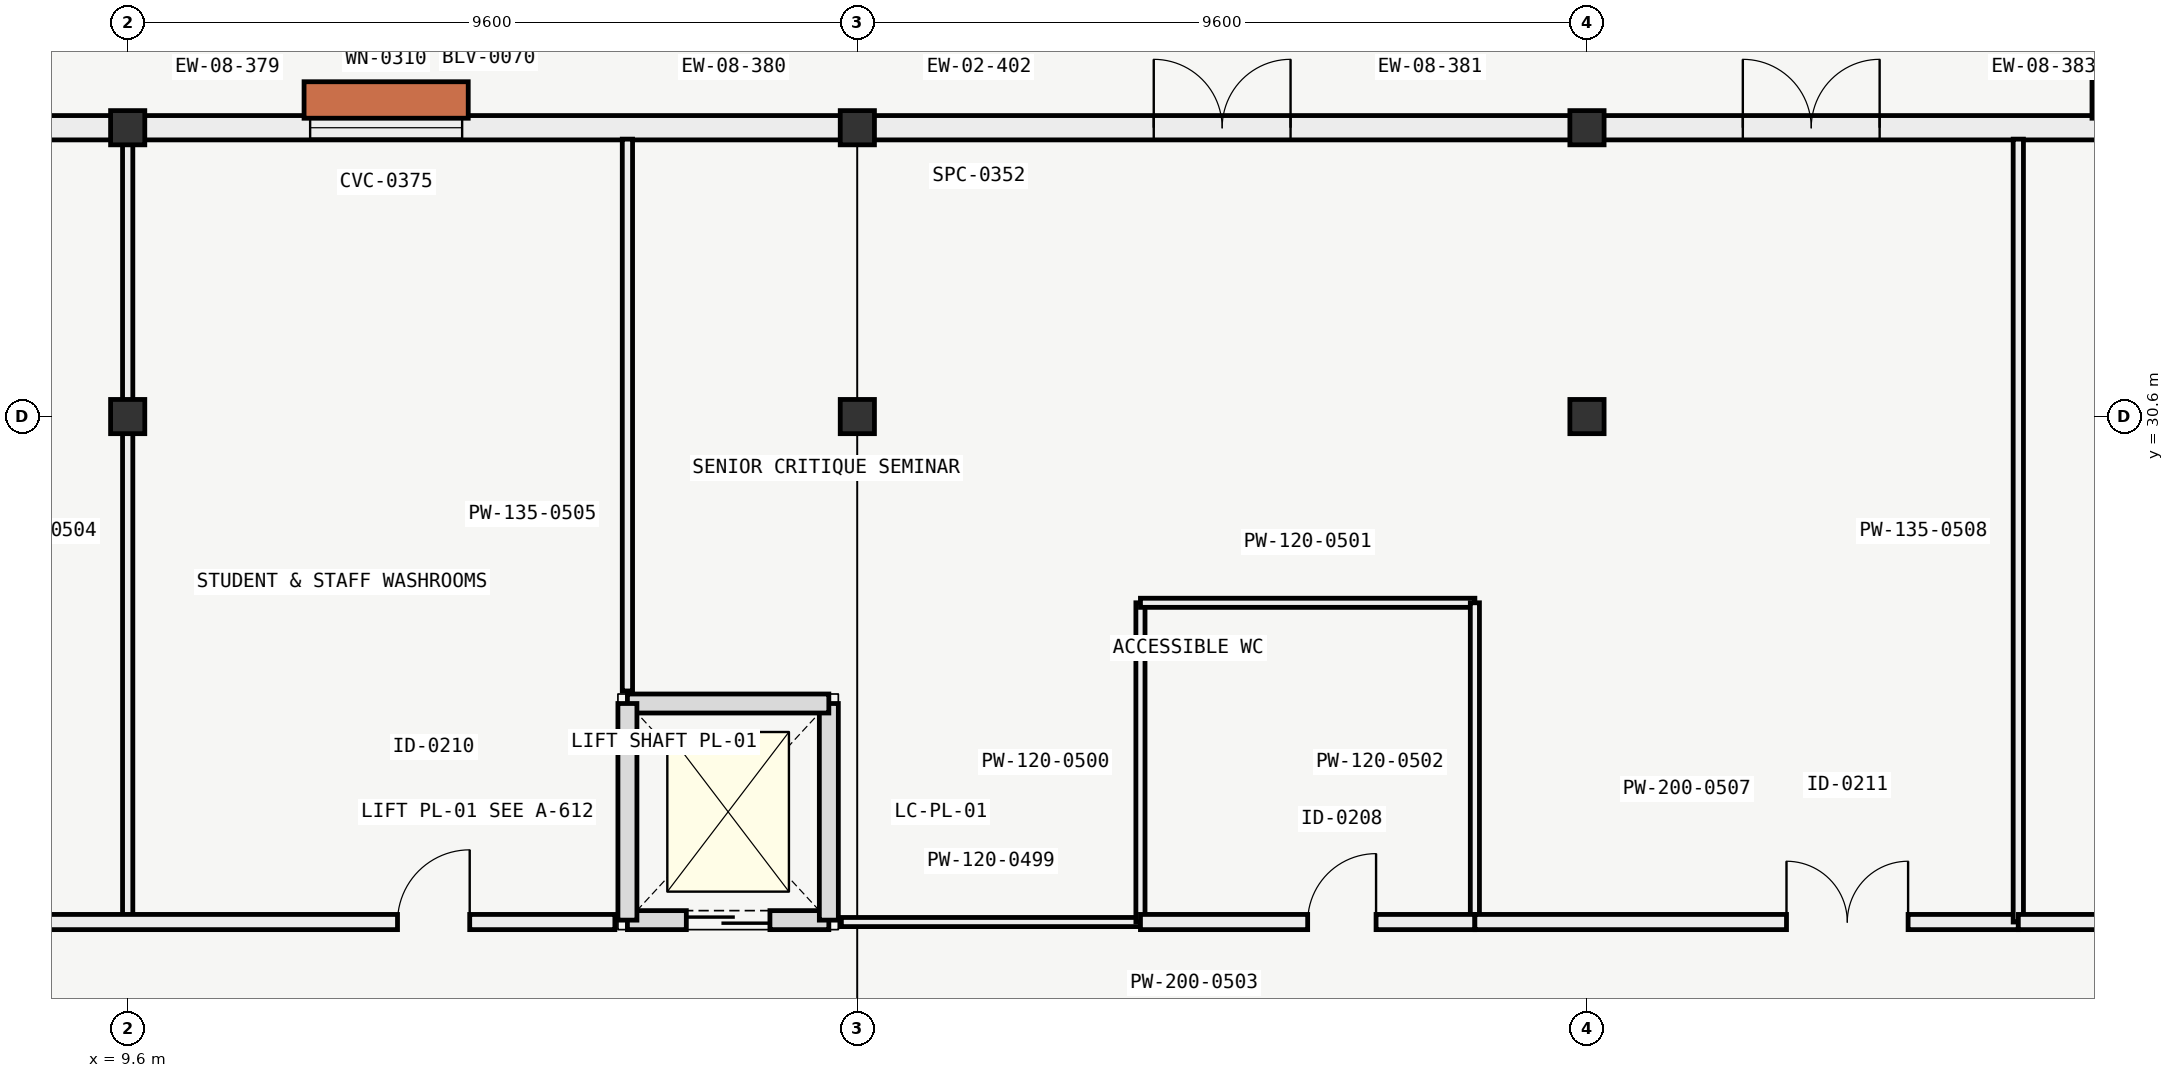
"""IFC4 building model, lengths in metres.
Left out: names, types, materials, properties, quantities, classifications, styles, units other than length and angle.
Written with IfcOpenShell. Run it as: python <this file> out.ifc"""

import sys

from ifc_helpers import new_model, si_unit, direction, frame, frame_2d, origin, origin_2d, place, context, subcontext, project, spatial, rectangle, extrude, element, fill, save


model = new_model("IFC4")
c1 = context("Model", 3, precision=1e-05, world=origin(), true_north=direction((0.0, 1.0)))
c2 = subcontext(c1, "Body", "Model", "MODEL_VIEW")
j1 = project(units=[si_unit("LENGTHUNIT", "METRE"), si_unit("PLANEANGLEUNIT", "RADIAN")], contexts=[c1])
p1 = place(None, origin())
s1 = spatial("IfcSite", under=j1, at=p1, CompositionType="ELEMENT")
p2 = place(p1, origin())
s2 = spatial("IfcBuilding", under=s1, at=p2, CompositionType="ELEMENT")
p3 = place(p2, frame((0.0, 0.0, 30.6)))
s3 = spatial("IfcBuildingStorey", under=s2, at=p3, CompositionType="ELEMENT", Elevation=30.6)
for number, where, z_axis, x_axis in (
    (1, (9.6, 30.6, 0.0), (0.0, 0.0, 1.0), (1.0, 0.0, 0.0)),
    (2, (9.6, 34.4, 0.0), (0.0, 0.0, 1.0), (1.0, 0.0, 0.0)),
    (3, (19.2, 30.6, 0.0), (0.0, 0.0, 1.0), (1.0, 0.0, 0.0)),
    (4, (19.2, 34.4, 0.0), (0.0, 0.0, 1.0), (1.0, 0.0, 0.0)),
    (5, (28.8, 30.6, 0.0), (0.0, 0.0, 1.0), (1.0, 0.0, 0.0)),
    (6, (28.8, 34.4, 0.0), (0.0, 0.0, 1.0), (1.0, 0.0, 0.0)),
):
    element("IfcColumn", number, at=place(p3, frame(where, z_axis=z_axis, x_axis=x_axis)), inside=s3, PredefinedType="COLUMN", context=c2, shape_type="SweptSolid", body=[
        extrude(rectangle(XDim=0.45, YDim=0.45, at=origin_2d()), origin(), (0.0, 0.0, 1.0), 4.2),
    ])
p4 = place(p3, frame((0.226, 34.4, 0.0), z_axis=(0.0, 0.0, 1.0), x_axis=(1.0, 0.0, 0.0)))
e7 = element("IfcWall", 7, at=p4, inside=s3, PredefinedType="SOLIDWALL", context=c2, shape_type="SweptSolid", body=[
    extrude(rectangle(XDim=9.148, YDim=0.28, at=frame_2d((4.574, 0.0))), origin(), (0.0, 0.0, 1.0), 3.3),
])
p5 = place(p4, frame((3.574, 0.0, 0.85)))
e8 = element("IfcOpeningElement", 8, at=p5, cuts=e7, PredefinedType="OPENING", context=c2, shape_type="SweptSolid", body=[
    extrude(rectangle(XDim=2.0, YDim=1.35, at=frame_2d((1.0, 0.675))), frame((0.0, 0.15, 0.0), z_axis=(0.0, -1.0, 0.0), x_axis=(1.0, 0.0, 0.0)), (0.0, 0.0, 1.0), 0.3),
])
p6 = place(p3, frame((9.826, 34.4, 0.0), z_axis=(0.0, 0.0, 1.0), x_axis=(1.0, 0.0, 0.0)))
e9 = element("IfcWall", 9, at=p6, inside=s3, PredefinedType="SOLIDWALL", context=c2, shape_type="SweptSolid", body=[
    extrude(rectangle(XDim=6.349, YDim=0.28, at=frame_2d((3.175, 0.0))), origin(), (0.0, 0.0, 1.0), 3.3),
])
p7 = place(p6, frame((2.175, 0.0, 0.85)))
e10 = element("IfcOpeningElement", 10, at=p7, cuts=e9, PredefinedType="OPENING", context=c2, shape_type="SweptSolid", body=[
    extrude(rectangle(XDim=2.0, YDim=1.35, at=frame_2d((1.0, 0.675))), frame((0.0, 0.15, 0.0), z_axis=(0.0, -1.0, 0.0), x_axis=(1.0, 0.0, 0.0)), (0.0, 0.0, 1.0), 0.3),
])
p8 = place(p3, frame((16.175, 34.4, 0.0), z_axis=(0.0, 0.0, 1.0), x_axis=(1.0, 0.0, 0.0)))
e11 = element("IfcWall", 11, at=p8, inside=s3, PredefinedType="SOLIDWALL", context=c2, shape_type="SweptSolid", body=[
    extrude(rectangle(XDim=2.799, YDim=0.28, at=frame_2d((1.399, 0.0))), origin(), (0.0, 0.0, 1.0), 3.3),
])
p9 = place(p3, frame((19.426, 34.4, 0.0), z_axis=(0.0, 0.0, 1.0), x_axis=(1.0, 0.0, 0.0)))
e12 = element("IfcWall", 12, at=p9, inside=s3, PredefinedType="SOLIDWALL", context=c2, shape_type="SweptSolid", body=[
    extrude(rectangle(XDim=9.148, YDim=0.28, at=frame_2d((4.574, 0.0))), origin(), (0.0, 0.0, 1.0), 3.3),
])
p10 = place(p9, frame((3.674, 0.0, 0.0)))
e13 = element("IfcOpeningElement", 13, at=p10, cuts=e12, PredefinedType="OPENING", context=c2, shape_type="SweptSolid", body=[
    extrude(rectangle(XDim=1.8, YDim=2.2, at=frame_2d((0.9, 1.1))), frame((0.0, 0.15, 0.0), z_axis=(0.0, -1.0, 0.0), x_axis=(1.0, 0.0, 0.0)), (0.0, 0.0, 1.0), 0.3),
])
p11 = place(p3, frame((29.026, 34.4, 0.0), z_axis=(0.0, 0.0, 1.0), x_axis=(1.0, 0.0, 0.0)))
e14 = element("IfcWall", 14, at=p11, inside=s3, PredefinedType="SOLIDWALL", context=c2, shape_type="SweptSolid", body=[
    extrude(rectangle(XDim=5.449, YDim=0.28, at=frame_2d((2.725, 0.0))), origin(), (0.0, 0.0, 1.0), 3.3),
])
p12 = place(p11, frame((1.824, 0.0, 0.0)))
e15 = element("IfcOpeningElement", 15, at=p12, cuts=e14, PredefinedType="OPENING", context=c2, shape_type="SweptSolid", body=[
    extrude(rectangle(XDim=1.8, YDim=2.2, at=frame_2d((0.9, 1.1))), frame((0.0, 0.15, 0.0), z_axis=(0.0, -1.0, 0.0), x_axis=(1.0, 0.0, 0.0)), (0.0, 0.0, 1.0), 0.3),
])
p13 = place(p3, frame((34.475, 34.4, 0.0), z_axis=(0.0, 0.0, 1.0), x_axis=(1.0, 0.0, 0.0)))
e16 = element("IfcWall", 16, at=p13, inside=s3, PredefinedType="SOLIDWALL", context=c2, shape_type="SweptSolid", body=[
    extrude(rectangle(XDim=3.699, YDim=0.28, at=frame_2d((1.85, 0.0))), origin(), (0.0, 0.0, 1.0), 3.3),
])
p14 = place(p13, frame((1.05, 0.0, 0.85)))
e17 = element("IfcOpeningElement", 17, at=p14, cuts=e16, PredefinedType="OPENING", context=c2, shape_type="SweptSolid", body=[
    extrude(rectangle(XDim=1.6, YDim=1.9, at=frame_2d((0.8, 0.95))), frame((0.0, 0.15, 0.0), z_axis=(0.0, -1.0, 0.0), x_axis=(1.0, 0.0, 0.0)), (0.0, 0.0, 1.0), 0.3),
])
p15 = place(p3, frame((0.0, 34.4, 4.2), z_axis=(0.0, 0.0, 1.0), x_axis=(1.0, 0.0, 0.0)))
e18 = element("IfcWall", 18, at=p15, inside=s3, PredefinedType="SOLIDWALL", context=c2, shape_type="SweptSolid", body=[
    extrude(rectangle(XDim=41.6, YDim=0.32, at=frame_2d((20.8, 0.0))), origin(), (0.0, 0.0, 1.0), 0.551),
])
p16 = place(p3, frame((16.175, 23.975, 0.0), z_axis=(0.0, 0.0, 1.0), x_axis=(1.0, 0.0, 0.0)))
e19 = element("IfcWall", 19, at=p16, inside=s3, PredefinedType="SOLIDWALL", context=c2, shape_type="SweptSolid", body=[
    extrude(rectangle(XDim=2.65, YDim=0.25, at=frame_2d((1.325, 0.0))), origin(), (0.0, 0.0, 1.0), 3.4),
])
p17 = place(p16, frame((0.775, 0.0, 0.0)))
e20 = element("IfcOpeningElement", 20, at=p17, cuts=e19, PredefinedType="OPENING", context=c2, shape_type="SweptSolid", body=[
    extrude(rectangle(XDim=1.1, YDim=2.1, at=frame_2d((0.55, 1.05))), frame((0.0, 0.135, 0.0), z_axis=(0.0, -1.0, 0.0), x_axis=(1.0, 0.0, 0.0)), (0.0, 0.0, 1.0), 0.27),
])
p18 = place(p3, frame((18.825, 23.975, 0.0), z_axis=(0.0, 0.0, 1.0), x_axis=(0.0, 1.0, 0.0)))
e21 = element("IfcWall", 21, at=p18, inside=s3, PredefinedType="SOLIDWALL", context=c2, shape_type="SweptSolid", body=[
    extrude(rectangle(XDim=2.85, YDim=0.25, at=frame_2d((1.425, 0.0))), origin(), (0.0, 0.0, 1.0), 3.4),
])
p19 = place(p3, frame((18.825, 26.825, 0.0), z_axis=(0.0, 0.0, 1.0), x_axis=(-1.0, 0.0, 0.0)))
e22 = element("IfcWall", 22, at=p19, inside=s3, PredefinedType="SOLIDWALL", context=c2, shape_type="SweptSolid", body=[
    extrude(rectangle(XDim=2.65, YDim=0.25, at=frame_2d((1.325, 0.0))), origin(), (0.0, 0.0, 1.0), 3.4),
])
p20 = place(p3, frame((16.175, 26.825, 0.0), z_axis=(0.0, 0.0, 1.0), x_axis=(0.0, -1.0, 0.0)))
e23 = element("IfcWall", 23, at=p20, inside=s3, PredefinedType="SOLIDWALL", context=c2, shape_type="SweptSolid", body=[
    extrude(rectangle(XDim=2.85, YDim=0.25, at=frame_2d((1.425, 0.0))), origin(), (0.0, 0.0, 1.0), 3.4),
])
p21 = place(p3, frame((18.99, 23.95, 0.0), z_axis=(0.0, 0.0, 1.0), x_axis=(1.0, 0.0, 0.0)))
e24 = element("IfcWall", 24, at=p21, inside=s3, PredefinedType="PARTITIONING", context=c2, shape_type="SweptSolid", body=[
    extrude(rectangle(XDim=3.935, YDim=0.12, at=frame_2d((1.968, 0.0))), origin(), (0.0, 0.0, 1.0), 3.85),
])
p22 = place(p3, frame((22.925, 23.95, 0.0), z_axis=(0.0, 0.0, 1.0), x_axis=(0.0, 1.0, 0.0)))
e25 = element("IfcWall", 25, at=p22, inside=s3, PredefinedType="PARTITIONING", context=c2, shape_type="SweptSolid", body=[
    extrude(rectangle(XDim=4.2, YDim=0.12, at=frame_2d((2.1, 0.0))), origin(), (0.0, 0.0, 1.0), 3.85),
])
p23 = place(p3, frame((22.925, 28.15, 0.0), z_axis=(0.0, 0.0, 1.0), x_axis=(1.0, 0.0, 0.0)))
e26 = element("IfcWall", 26, at=p23, inside=s3, PredefinedType="PARTITIONING", context=c2, shape_type="SweptSolid", body=[
    extrude(rectangle(XDim=4.4, YDim=0.12, at=frame_2d((2.2, 0.0))), origin(), (0.0, 0.0, 1.0), 3.85),
])
p24 = place(p3, frame((27.325, 23.95, 0.0), z_axis=(0.0, 0.0, 1.0), x_axis=(0.0, 1.0, 0.0)))
e27 = element("IfcWall", 27, at=p24, inside=s3, PredefinedType="PARTITIONING", context=c2, shape_type="SweptSolid", body=[
    extrude(rectangle(XDim=4.2, YDim=0.12, at=frame_2d((2.1, 0.0))), origin(), (0.0, 0.0, 1.0), 3.85),
])
p25 = place(p3, frame((22.925, 23.95, 0.0), z_axis=(0.0, 0.0, 1.0), x_axis=(1.0, 0.0, 0.0)))
e28 = element("IfcWall", 28, at=p25, inside=s3, PredefinedType="PARTITIONING", context=c2, shape_type="SweptSolid", body=[
    extrude(rectangle(XDim=4.4, YDim=0.2, at=frame_2d((2.2, 0.0))), origin(), (0.0, 0.0, 1.0), 3.85),
])
p26 = place(p25, frame((2.2, 0.0, 0.0)))
e29 = element("IfcOpeningElement", 29, at=p26, cuts=e28, PredefinedType="OPENING", context=c2, shape_type="SweptSolid", body=[
    extrude(rectangle(XDim=0.9, YDim=2.05, at=frame_2d((0.45, 1.025))), frame((0.0, 0.11, 0.0), z_axis=(0.0, -1.0, 0.0), x_axis=(1.0, 0.0, 0.0)), (0.0, 0.0, 1.0), 0.22),
])
p27 = place(p3, frame((9.6, 23.95, 0.0), z_axis=(0.0, 0.0, 1.0), x_axis=(0.0, 1.0, 0.0)))
e30 = element("IfcWall", 30, at=p27, inside=s3, PredefinedType="PARTITIONING", context=c2, shape_type="SweptSolid", body=[
    extrude(rectangle(XDim=10.3, YDim=0.135, at=frame_2d((5.15, 0.0))), origin(), (0.0, 0.0, 1.0), 3.85),
])
p28 = place(p3, frame((16.175, 26.99, 0.0), z_axis=(0.0, 0.0, 1.0), x_axis=(0.0, 1.0, 0.0)))
e31 = element("IfcWall", 31, at=p28, inside=s3, PredefinedType="PARTITIONING", context=c2, shape_type="SweptSolid", body=[
    extrude(rectangle(XDim=7.26, YDim=0.135, at=frame_2d((3.63, 0.0))), origin(), (0.0, 0.0, 1.0), 3.85),
])
p29 = place(p3, frame((0.15, 23.95, 0.0), z_axis=(0.0, 0.0, 1.0), x_axis=(1.0, 0.0, 0.0)))
e32 = element("IfcWall", 32, at=p29, inside=s3, PredefinedType="PARTITIONING", context=c2, shape_type="SweptSolid", body=[
    extrude(rectangle(XDim=15.86, YDim=0.2, at=frame_2d((7.93, 0.0))), origin(), (0.0, 0.0, 1.0), 3.63),
])
p30 = place(p29, frame((6.05, 0.0, 0.0)))
e33 = element("IfcOpeningElement", 33, at=p30, cuts=e32, PredefinedType="OPENING", context=c2, shape_type="SweptSolid", body=[
    extrude(rectangle(XDim=1.6, YDim=2.25, at=frame_2d((0.8, 1.125))), frame((0.0, 0.11, 0.0), z_axis=(0.0, -1.0, 0.0), x_axis=(1.0, 0.0, 0.0)), (0.0, 0.0, 1.0), 0.22),
])
p31 = place(p29, frame((13.0, 0.0, 0.0)))
e34 = element("IfcOpeningElement", 34, at=p31, cuts=e32, PredefinedType="OPENING", context=c2, shape_type="SweptSolid", body=[
    extrude(rectangle(XDim=0.95, YDim=2.1, at=frame_2d((0.475, 1.05))), frame((0.0, 0.11, 0.0), z_axis=(0.0, -1.0, 0.0), x_axis=(1.0, 0.0, 0.0)), (0.0, 0.0, 1.0), 0.22),
])
p32 = place(p3, frame((27.325, 23.95, 0.0), z_axis=(0.0, 0.0, 1.0), x_axis=(1.0, 0.0, 0.0)))
e35 = element("IfcWall", 35, at=p32, inside=s3, PredefinedType="PARTITIONING", context=c2, shape_type="SweptSolid", body=[
    extrude(rectangle(XDim=7.15, YDim=0.2, at=frame_2d((3.575, 0.0))), origin(), (0.0, 0.0, 1.0), 3.85),
])
p33 = place(p32, frame((4.1, 0.0, 0.0)))
e36 = element("IfcOpeningElement", 36, at=p33, cuts=e35, PredefinedType="OPENING", context=c2, shape_type="SweptSolid", body=[
    extrude(rectangle(XDim=1.6, YDim=2.25, at=frame_2d((0.8, 1.125))), frame((0.0, 0.11, 0.0), z_axis=(0.0, -1.0, 0.0), x_axis=(1.0, 0.0, 0.0)), (0.0, 0.0, 1.0), 0.22),
])
p34 = place(p3, frame((34.475, 23.95, 0.0), z_axis=(0.0, 0.0, 1.0), x_axis=(0.0, 1.0, 0.0)))
e37 = element("IfcWall", 37, at=p34, inside=s3, PredefinedType="PARTITIONING", context=c2, shape_type="SweptSolid", body=[
    extrude(rectangle(XDim=10.3, YDim=0.135, at=frame_2d((5.15, 0.0))), origin(), (0.0, 0.0, 1.0), 3.85),
])
p35 = place(p3, frame((34.475, 23.95, 0.0), z_axis=(0.0, 0.0, 1.0), x_axis=(1.0, 0.0, 0.0)))
e38 = element("IfcWall", 38, at=p35, inside=s3, PredefinedType="PARTITIONING", context=c2, shape_type="SweptSolid", body=[
    extrude(rectangle(XDim=6.975, YDim=0.2, at=frame_2d((3.487, 0.0))), origin(), (0.0, 0.0, 1.0), 3.85),
])
p36 = place(p35, frame((2.1, 0.0, 0.0)))
e39 = element("IfcOpeningElement", 39, at=p36, cuts=e38, PredefinedType="OPENING", context=c2, shape_type="SweptSolid", body=[
    extrude(rectangle(XDim=0.95, YDim=2.1, at=frame_2d((0.475, 1.05))), frame((0.0, 0.11, 0.0), z_axis=(0.0, -1.0, 0.0), x_axis=(1.0, 0.0, 0.0)), (0.0, 0.0, 1.0), 0.22),
])
p37 = place(p7, origin())
e40 = element("IfcWindow", 40, at=p37, inside=s3, PartitioningType="SINGLE_PANEL", PredefinedType="WINDOW", context=c2, shape_type="SweptSolid", body=[
    extrude(rectangle(XDim=2.0, YDim=1.35, at=frame_2d((1.0, 0.675))), frame((0.0, 0.03, 0.0), z_axis=(0.0, -1.0, 0.0), x_axis=(1.0, 0.0, 0.0)), (0.0, 0.0, 1.0), 0.06),
])
fill(e10, e40)
p38 = place(p10, origin())
e41 = element("IfcDoor", 41, at=p38, inside=s3, OperationType="DOUBLE_DOOR_SINGLE_SWING", PredefinedType="DOOR", context=c2, shape_type="SweptSolid", body=[
    extrude(rectangle(XDim=1.8, YDim=2.2, at=frame_2d((0.9, 1.1))), frame((0.0, 0.025, 0.0), z_axis=(0.0, -1.0, 0.0), x_axis=(1.0, 0.0, 0.0)), (0.0, 0.0, 1.0), 0.05),
])
fill(e13, e41)
p39 = place(p12, origin())
e42 = element("IfcDoor", 42, at=p39, inside=s3, OperationType="DOUBLE_DOOR_SINGLE_SWING", PredefinedType="DOOR", context=c2, shape_type="SweptSolid", body=[
    extrude(rectangle(XDim=1.8, YDim=2.2, at=frame_2d((0.9, 1.1))), frame((0.0, 0.025, 0.0), z_axis=(0.0, -1.0, 0.0), x_axis=(1.0, 0.0, 0.0)), (0.0, 0.0, 1.0), 0.05),
])
fill(e15, e42)
p40 = place(p17, origin())
e43 = element("IfcDoor", 43, at=p40, inside=s3, OperationType="SLIDING_TO_LEFT", PredefinedType="DOOR", context=c2, shape_type="SweptSolid", body=[
    extrude(rectangle(XDim=1.1, YDim=2.1, at=frame_2d((0.55, 1.05))), frame((0.0, 0.025, 0.0), z_axis=(0.0, -1.0, 0.0), x_axis=(1.0, 0.0, 0.0)), (0.0, 0.0, 1.0), 0.05),
])
fill(e20, e43)
p41 = place(p26, origin())
e44 = element("IfcDoor", 44, at=p41, inside=s3, OperationType="SINGLE_SWING_RIGHT", PredefinedType="DOOR", context=c2, shape_type="SweptSolid", body=[
    extrude(rectangle(XDim=0.9, YDim=2.05, at=frame_2d((0.45, 1.025))), frame((0.0, 0.025, 0.0), z_axis=(0.0, -1.0, 0.0), x_axis=(1.0, 0.0, 0.0)), (0.0, 0.0, 1.0), 0.05),
])
fill(e29, e44)
p42 = place(p31, origin())
e45 = element("IfcDoor", 45, at=p42, inside=s3, OperationType="SINGLE_SWING_RIGHT", PredefinedType="DOOR", context=c2, shape_type="SweptSolid", body=[
    extrude(rectangle(XDim=0.95, YDim=2.1, at=frame_2d((0.475, 1.05))), frame((0.0, 0.025, 0.0), z_axis=(0.0, -1.0, 0.0), x_axis=(1.0, 0.0, 0.0)), (0.0, 0.0, 1.0), 0.05),
])
fill(e34, e45)
p43 = place(p33, origin())
e46 = element("IfcDoor", 46, at=p43, inside=s3, OperationType="DOUBLE_DOOR_SINGLE_SWING", PredefinedType="DOOR", context=c2, shape_type="SweptSolid", body=[
    extrude(rectangle(XDim=1.6, YDim=2.25, at=frame_2d((0.8, 1.125))), frame((0.0, 0.025, 0.0), z_axis=(0.0, -1.0, 0.0), x_axis=(1.0, 0.0, 0.0)), (0.0, 0.0, 1.0), 0.05),
])
fill(e36, e46)
save(model, sys.argv[1])
